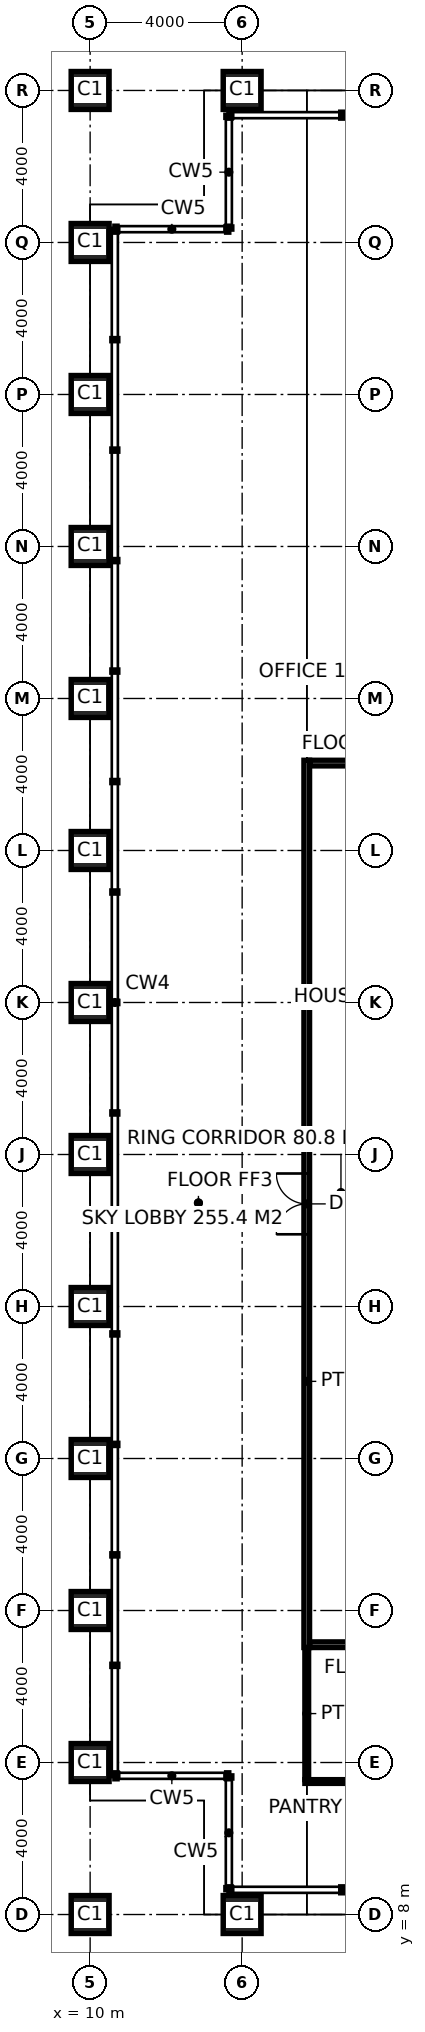
"""IFC4 building model, lengths in metres.
Left out: names, types, materials, properties, quantities, classifications, styles, units other than length and angle.
Written with IfcOpenShell. Run it as: python <this file> out.ifc"""

import sys

from ifc_helpers import new_model, si_unit, direction, frame, frame_2d, origin, origin_2d, place, context, subcontext, project, spatial, rectangle, hollow_rectangle, extrude, element, fill, save


model = new_model("IFC4")
c1 = context("Model", 3, precision=1e-05, world=origin(), true_north=direction((0.0, 1.0)))
c2 = subcontext(c1, "Body", "Model", "MODEL_VIEW")
j1 = project(units=[si_unit("LENGTHUNIT", "METRE"), si_unit("PLANEANGLEUNIT", "RADIAN")], contexts=[c1])
p1 = place(None, origin())
s1 = spatial("IfcSite", under=j1, at=p1, CompositionType="ELEMENT")
p2 = place(p1, origin())
s2 = spatial("IfcBuilding", under=s1, at=p2, CompositionType="ELEMENT")
p3 = place(p2, frame((0.0, 0.0, 209.2)))
s3 = spatial("IfcBuildingStorey", under=s2, at=p3, CompositionType="ELEMENT", Elevation=209.2)
for number, where, z_axis, x_axis in (
    (1, (10.0, 8.0, 0.0), (0.0, 0.0, 1.0), (1.0, 0.0, 0.0)),
    (2, (10.0, 12.0, 0.0), (0.0, 0.0, 1.0), (1.0, 0.0, 0.0)),
    (3, (10.0, 16.0, 0.0), (0.0, 0.0, 1.0), (1.0, 0.0, 0.0)),
    (4, (10.0, 20.0, 0.0), (0.0, 0.0, 1.0), (1.0, 0.0, 0.0)),
    (5, (10.0, 24.0, 0.0), (0.0, 0.0, 1.0), (1.0, 0.0, 0.0)),
    (6, (10.0, 28.0, 0.0), (0.0, 0.0, 1.0), (1.0, 0.0, 0.0)),
    (7, (10.0, 32.0, 0.0), (0.0, 0.0, 1.0), (1.0, 0.0, 0.0)),
    (8, (10.0, 36.0, 0.0), (0.0, 0.0, 1.0), (1.0, 0.0, 0.0)),
    (9, (10.0, 40.0, 0.0), (0.0, 0.0, 1.0), (1.0, 0.0, 0.0)),
    (10, (10.0, 44.0, 0.0), (0.0, 0.0, 1.0), (1.0, 0.0, 0.0)),
    (11, (10.0, 48.0, 0.0), (0.0, 0.0, 1.0), (1.0, 0.0, 0.0)),
    (12, (10.0, 52.0, 0.0), (0.0, 0.0, 1.0), (1.0, 0.0, 0.0)),
    (13, (10.0, 56.0, 0.0), (0.0, 0.0, 1.0), (1.0, 0.0, 0.0)),
    (14, (14.0, 8.0, 0.0), (0.0, 0.0, 1.0), (1.0, 0.0, 0.0)),
    (15, (14.0, 56.0, 0.0), (0.0, 0.0, 1.0), (1.0, 0.0, 0.0)),
):
    element("IfcColumn", number, at=place(p3, frame(where, z_axis=z_axis, x_axis=x_axis)), inside=s3, PredefinedType="COLUMN", context=c2, shape_type="SweptSolid", body=[
        extrude(hollow_rectangle(XDim=1.0, YDim=1.0, WallThickness=0.1, at=origin_2d()), origin(), (0.0, 0.0, 1.0), 5.0),
    ])
p4 = place(p3, frame((15.7, 15.025, 0.0), z_axis=(0.0, 0.0, 1.0), x_axis=(0.0, 1.0, 0.0)))
e16 = element("IfcWall", 16, at=p4, inside=s3, PredefinedType="PARTITIONING", context=c2, shape_type="SweptSolid", body=[
    extrude(rectangle(XDim=23.35, YDim=0.15, at=frame_2d((11.675, 0.0))), origin(), (0.0, 0.0, 1.0), 4.85),
])
p5 = place(p4, frame((10.875, 0.0, 0.0)))
e17 = element("IfcOpeningElement", 17, at=p5, cuts=e16, PredefinedType="OPENING", context=c2, shape_type="SweptSolid", body=[
    extrude(rectangle(XDim=1.6, YDim=2.7, at=frame_2d((0.8, 1.35))), frame((0.0, 0.085, 0.0), z_axis=(0.0, -1.0, 0.0), x_axis=(1.0, 0.0, 0.0)), (0.0, 0.0, 1.0), 0.17),
])
p6 = place(p3, frame((15.775, 15.1, 0.0), z_axis=(0.0, 0.0, 1.0), x_axis=(1.0, 0.0, 0.0)))
e18 = element("IfcWall", 18, at=p6, inside=s3, PredefinedType="PARTITIONING", context=c2, shape_type="SweptSolid", body=[
    extrude(rectangle(XDim=22.05, YDim=0.15, at=frame_2d((11.025, 0.0))), origin(), (0.0, 0.0, 1.0), 4.85),
])
p7 = place(p3, frame((15.775, 38.3, 0.0), z_axis=(0.0, 0.0, 1.0), x_axis=(1.0, 0.0, 0.0)))
e19 = element("IfcWall", 19, at=p7, inside=s3, PredefinedType="PARTITIONING", context=c2, shape_type="SweptSolid", body=[
    extrude(rectangle(XDim=22.05, YDim=0.15, at=frame_2d((11.025, 0.0))), origin(), (0.0, 0.0, 1.0), 4.85),
])
p8 = place(p7, frame((7.975, 0.0, 0.0)))
e20 = element("IfcOpeningElement", 20, at=p8, cuts=e19, PredefinedType="OPENING", context=c2, shape_type="SweptSolid", body=[
    extrude(rectangle(XDim=0.9, YDim=2.1, at=frame_2d((0.45, 1.05))), frame((0.0, 0.085, 0.0), z_axis=(0.0, -1.0, 0.0), x_axis=(1.0, 0.0, 0.0)), (0.0, 0.0, 1.0), 0.17),
])
p9 = place(p7, frame((11.725, 0.0, 0.0)))
e21 = element("IfcOpeningElement", 21, at=p9, cuts=e19, PredefinedType="OPENING", context=c2, shape_type="SweptSolid", body=[
    extrude(rectangle(XDim=1.0, YDim=2.1, at=frame_2d((0.5, 1.05))), frame((0.0, 0.085, 0.0), z_axis=(0.0, -1.0, 0.0), x_axis=(1.0, 0.0, 0.0)), (0.0, 0.0, 1.0), 0.17),
])
p10 = place(p7, frame((15.575, 0.0, 0.0)))
e22 = element("IfcOpeningElement", 22, at=p10, cuts=e19, PredefinedType="OPENING", context=c2, shape_type="SweptSolid", body=[
    extrude(rectangle(XDim=0.9, YDim=2.1, at=frame_2d((0.45, 1.05))), frame((0.0, 0.085, 0.0), z_axis=(0.0, -1.0, 0.0), x_axis=(1.0, 0.0, 0.0)), (0.0, 0.0, 1.0), 0.17),
])
p11 = place(p3, frame((15.65, 11.5, 0.0), z_axis=(0.0, 0.0, 1.0), x_axis=(1.0, 0.0, 0.0)))
e23 = element("IfcWall", 23, at=p11, inside=s3, PredefinedType="PARTITIONING", context=c2, shape_type="SweptSolid", body=[
    extrude(rectangle(XDim=9.85, YDim=0.1, at=frame_2d((4.925, 0.0))), origin(), (0.0, 0.0, 1.0), 4.85),
])
p12 = place(p11, frame((1.4, 0.0, 0.0)))
e24 = element("IfcOpeningElement", 24, at=p12, cuts=e23, PredefinedType="OPENING", context=c2, shape_type="SweptSolid", body=[
    extrude(rectangle(XDim=1.0, YDim=2.2, at=frame_2d((0.5, 1.1))), frame((0.0, 0.06, 0.0), z_axis=(0.0, -1.0, 0.0), x_axis=(1.0, 0.0, 0.0)), (0.0, 0.0, 1.0), 0.12),
])
p13 = place(p11, frame((4.95, 0.0, 0.0)))
e25 = element("IfcOpeningElement", 25, at=p13, cuts=e23, PredefinedType="OPENING", context=c2, shape_type="SweptSolid", body=[
    extrude(rectangle(XDim=1.0, YDim=2.2, at=frame_2d((0.5, 1.1))), frame((0.0, 0.06, 0.0), z_axis=(0.0, -1.0, 0.0), x_axis=(1.0, 0.0, 0.0)), (0.0, 0.0, 1.0), 0.12),
])
p14 = place(p11, frame((7.975, 0.0, 0.0)))
e26 = element("IfcOpeningElement", 26, at=p14, cuts=e23, PredefinedType="OPENING", context=c2, shape_type="SweptSolid", body=[
    extrude(rectangle(XDim=1.0, YDim=2.2, at=frame_2d((0.5, 1.1))), frame((0.0, 0.06, 0.0), z_axis=(0.0, -1.0, 0.0), x_axis=(1.0, 0.0, 0.0)), (0.0, 0.0, 1.0), 0.12),
])
p15 = place(p3, frame((15.7, 11.55, 0.0), z_axis=(0.0, 0.0, 1.0), x_axis=(0.0, 1.0, 0.0)))
e27 = element("IfcWall", 27, at=p15, inside=s3, PredefinedType="PARTITIONING", context=c2, shape_type="SweptSolid", body=[
    extrude(rectangle(XDim=3.475, YDim=0.1, at=frame_2d((1.737, 0.0))), origin(), (0.0, 0.0, 1.0), 4.85),
])
p16 = place(p5, origin())
e28 = element("IfcDoor", 28, at=p16, inside=s3, OperationType="DOUBLE_DOOR_DOUBLE_SWING", PredefinedType="DOOR", context=c2, shape_type="SweptSolid", body=[
    extrude(rectangle(XDim=1.6, YDim=2.7, at=frame_2d((0.8, 1.35))), frame((0.0, 0.025, 0.0), z_axis=(0.0, -1.0, 0.0), x_axis=(1.0, 0.0, 0.0)), (0.0, 0.0, 1.0), 0.05),
])
fill(e17, e28)
save(model, sys.argv[1])
